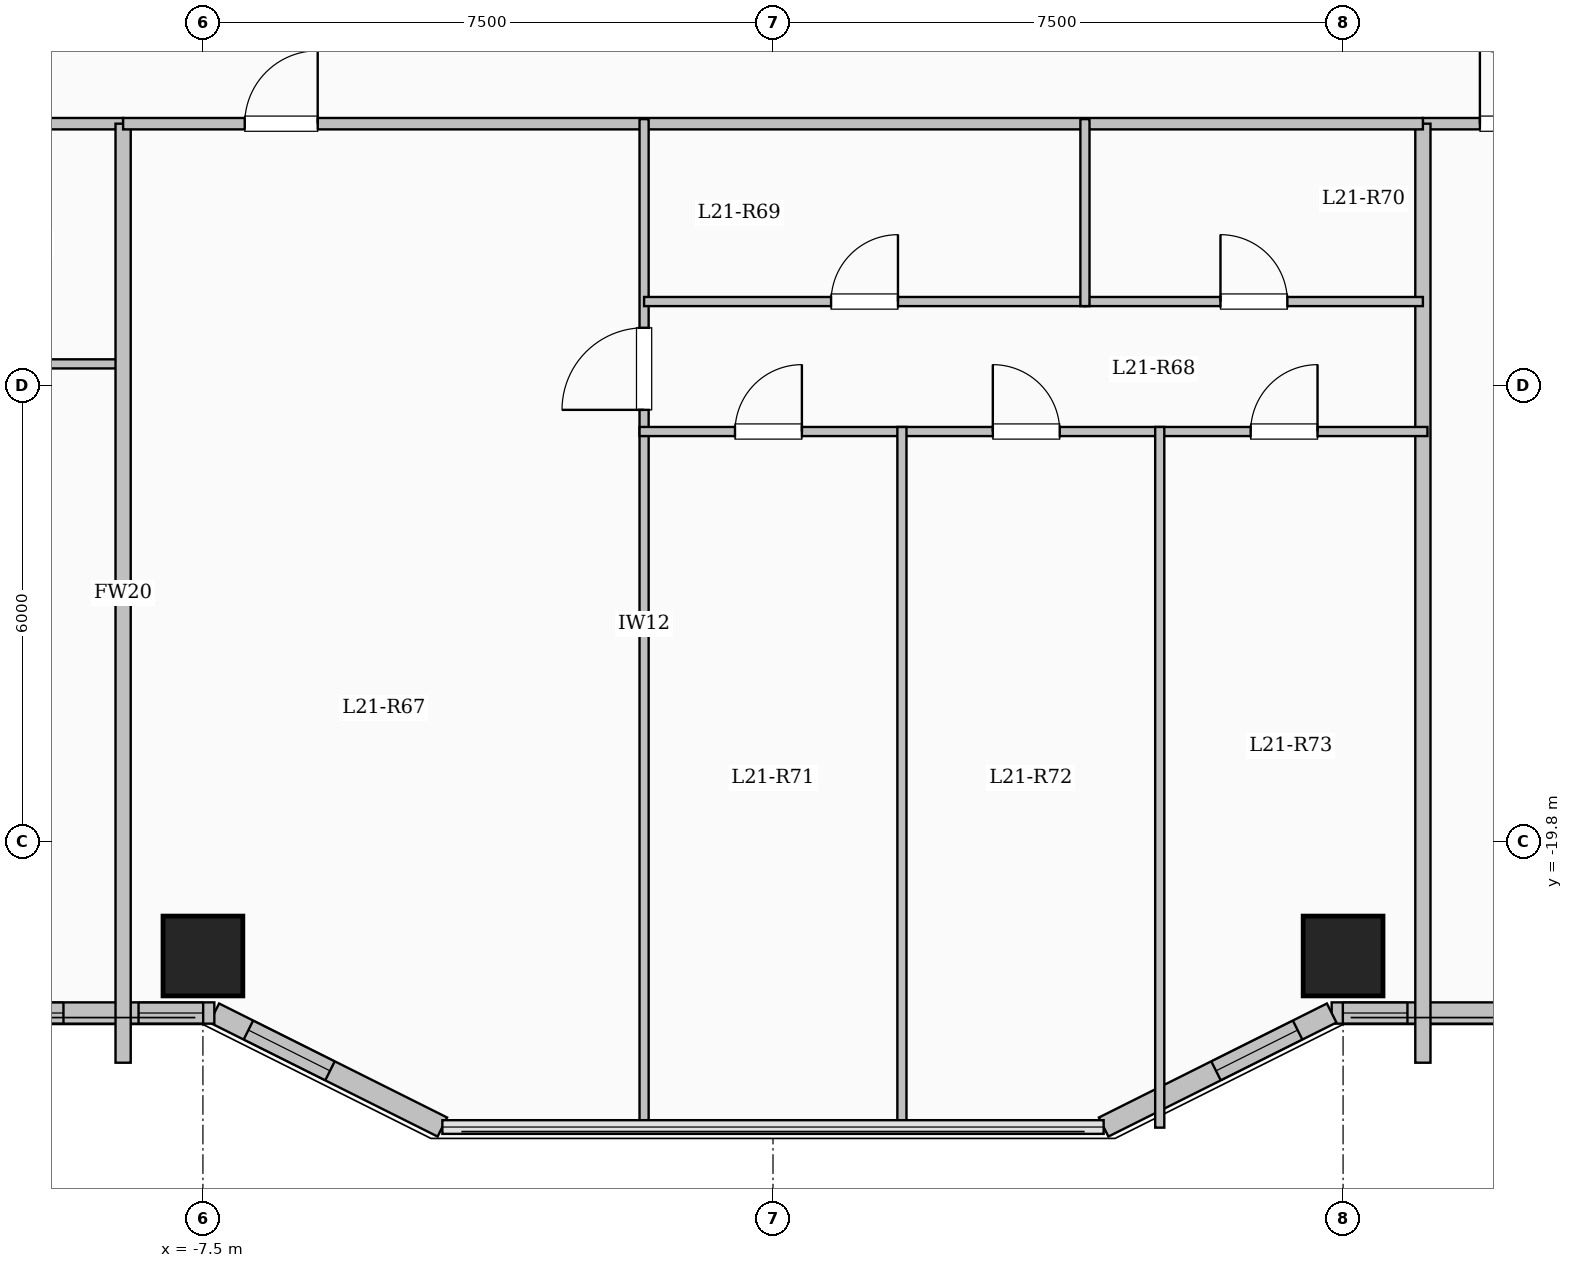
"""IFC4 building model, lengths in metres.
Left out: names, types, materials, properties, quantities, classifications, styles, units other than length and angle.
Written with IfcOpenShell. Run it as: python <this file> out.ifc"""

import sys

from ifc_helpers import new_model, si_unit, direction, frame, frame_2d, origin, origin_2d, place, context, subcontext, project, spatial, rectangle, extrude, element, fill, save


model = new_model("IFC4")
c1 = context("Model", 3, precision=1e-05, world=origin(), true_north=direction((0.0, 1.0)))
c2 = subcontext(c1, "Body", "Model", "MODEL_VIEW")
j1 = project(units=[si_unit("LENGTHUNIT", "METRE"), si_unit("PLANEANGLEUNIT", "RADIAN")], contexts=[c1])
p1 = place(None, origin())
s1 = spatial("IfcSite", under=j1, at=p1, CompositionType="ELEMENT")
p2 = place(p1, origin())
s2 = spatial("IfcBuilding", under=s1, at=p2, CompositionType="ELEMENT")
p3 = place(p2, frame((0.0, 0.0, 81.65)))
s3 = spatial("IfcBuildingStorey", under=s2, at=p3, CompositionType="ELEMENT", Elevation=81.65)
for number, where, z_axis, x_axis in (
    (1, (-7.5, -21.3, 0.0), (0.0, 0.0, 1.0), (1.0, 0.0, 0.0)),
    (2, (7.5, -21.3, 0.0), (0.0, 0.0, 1.0), (1.0, 0.0, 0.0)),
):
    element("IfcColumn", number, at=place(p3, frame(where, z_axis=z_axis, x_axis=x_axis)), inside=s3, PredefinedType="COLUMN", context=c2, shape_type="SweptSolid", body=[
        extrude(rectangle(XDim=1.05, YDim=1.05, at=origin_2d()), origin(), (0.0, 0.0, 1.0), 3.35),
    ])
p4 = place(p3, frame((21.15, -22.05, 0.0), z_axis=(0.0, 0.0, 1.0), x_axis=(-1.0, 0.0, 0.0)))
e3 = element("IfcWall", 3, at=p4, inside=s3, PredefinedType="SOLIDWALL", context=c2, shape_type="SweptSolid", body=[
    extrude(rectangle(XDim=13.8, YDim=0.28, at=frame_2d((6.9, 0.0))), origin(), (0.0, 0.0, 1.0), 3.1),
])
p5 = place(p4, frame((0.88, 0.0, 0.95)))
e4 = element("IfcOpeningElement", 4, at=p5, cuts=e3, PredefinedType="OPENING", context=c2, shape_type="SweptSolid", body=[
    extrude(rectangle(XDim=1.2, YDim=1.5, at=frame_2d((0.6, 0.75))), frame((0.0, 0.15, 0.0), z_axis=(0.0, -1.0, 0.0), x_axis=(1.0, 0.0, 0.0)), (0.0, 0.0, 1.0), 0.3),
])
p6 = place(p4, frame((3.64, 0.0, 0.95)))
e5 = element("IfcOpeningElement", 5, at=p6, cuts=e3, PredefinedType="OPENING", context=c2, shape_type="SweptSolid", body=[
    extrude(rectangle(XDim=1.2, YDim=1.5, at=frame_2d((0.6, 0.75))), frame((0.0, 0.15, 0.0), z_axis=(0.0, -1.0, 0.0), x_axis=(1.0, 0.0, 0.0)), (0.0, 0.0, 1.0), 0.3),
])
p7 = place(p4, frame((6.35, 0.0, 0.95)))
e6 = element("IfcOpeningElement", 6, at=p7, cuts=e3, PredefinedType="OPENING", context=c2, shape_type="SweptSolid", body=[
    extrude(rectangle(XDim=1.2, YDim=1.5, at=frame_2d((0.6, 0.75))), frame((0.0, 0.15, 0.0), z_axis=(0.0, -1.0, 0.0), x_axis=(1.0, 0.0, 0.0)), (0.0, 0.0, 1.0), 0.3),
])
p8 = place(p4, frame((9.238, 0.0, 0.9)))
e7 = element("IfcOpeningElement", 7, at=p8, cuts=e3, PredefinedType="OPENING", context=c2, shape_type="SweptSolid", body=[
    extrude(rectangle(XDim=2.4, YDim=1.8, at=frame_2d((1.2, 0.9))), frame((0.0, 0.15, 0.0), z_axis=(0.0, -1.0, 0.0), x_axis=(1.0, 0.0, 0.0)), (0.0, 0.0, 1.0), 0.3),
])
p9 = place(p4, frame((12.803, 0.0, 0.95)))
e8 = element("IfcOpeningElement", 8, at=p9, cuts=e3, PredefinedType="OPENING", context=c2, shape_type="SweptSolid", body=[
    extrude(rectangle(XDim=0.85, YDim=1.5, at=frame_2d((0.425, 0.75))), frame((0.0, 0.15, 0.0), z_axis=(0.0, -1.0, 0.0), x_axis=(1.0, 0.0, 0.0)), (0.0, 0.0, 1.0), 0.3),
])
p10 = place(p3, frame((7.35, -22.05, 0.0), z_axis=(0.0, 0.0, 1.0), x_axis=(-0.894427191, -0.4472135955, 0.0)))
e9 = element("IfcWall", 9, at=p10, inside=s3, PredefinedType="SOLIDWALL", context=c2, shape_type="SweptSolid", body=[
    extrude(rectangle(XDim=3.354, YDim=0.28, at=frame_2d((1.677, 0.0))), origin(), (0.0, 0.0, 1.0), 3.1),
])
p11 = place(p10, frame((0.501, 0.0, 0.95)))
e10 = element("IfcOpeningElement", 10, at=p11, cuts=e9, PredefinedType="OPENING", context=c2, shape_type="SweptSolid", body=[
    extrude(rectangle(XDim=1.2, YDim=1.5, at=frame_2d((0.6, 0.75))), frame((0.0, 0.15, 0.0), z_axis=(0.0, -1.0, 0.0), x_axis=(1.0, 0.0, 0.0)), (0.0, 0.0, 1.0), 0.3),
])
p12 = place(p3, frame((-4.35, -23.55, 0.0), z_axis=(0.0, 0.0, 1.0), x_axis=(-0.894427191, 0.4472135955, 0.0)))
e11 = element("IfcWall", 11, at=p12, inside=s3, PredefinedType="SOLIDWALL", context=c2, shape_type="SweptSolid", body=[
    extrude(rectangle(XDim=3.354, YDim=0.28, at=frame_2d((1.677, 0.0))), origin(), (0.0, 0.0, 1.0), 3.1),
])
p13 = place(p12, frame((1.653, 0.0, 0.95)))
e12 = element("IfcOpeningElement", 12, at=p13, cuts=e11, PredefinedType="OPENING", context=c2, shape_type="SweptSolid", body=[
    extrude(rectangle(XDim=1.2, YDim=1.5, at=frame_2d((0.6, 0.75))), frame((0.0, 0.15, 0.0), z_axis=(0.0, -1.0, 0.0), x_axis=(1.0, 0.0, 0.0)), (0.0, 0.0, 1.0), 0.3),
])
p14 = place(p3, frame((-7.35, -22.05, 0.0), z_axis=(0.0, 0.0, 1.0), x_axis=(-1.0, 0.0, 0.0)))
e13 = element("IfcWall", 13, at=p14, inside=s3, PredefinedType="SOLIDWALL", context=c2, shape_type="SweptSolid", body=[
    extrude(rectangle(XDim=13.8, YDim=0.28, at=frame_2d((6.9, 0.0))), origin(), (0.0, 0.0, 1.0), 3.1),
])
p15 = place(p14, frame((0.147, 0.0, 0.95)))
e14 = element("IfcOpeningElement", 14, at=p15, cuts=e13, PredefinedType="OPENING", context=c2, shape_type="SweptSolid", body=[
    extrude(rectangle(XDim=0.85, YDim=1.5, at=frame_2d((0.425, 0.75))), frame((0.0, 0.15, 0.0), z_axis=(0.0, -1.0, 0.0), x_axis=(1.0, 0.0, 0.0)), (0.0, 0.0, 1.0), 0.3),
])
p16 = place(p14, frame((1.985, 0.0, 0.9)))
e15 = element("IfcOpeningElement", 15, at=p16, cuts=e13, PredefinedType="OPENING", context=c2, shape_type="SweptSolid", body=[
    extrude(rectangle(XDim=1.5, YDim=1.65, at=frame_2d((0.75, 0.825))), frame((0.0, 0.15, 0.0), z_axis=(0.0, -1.0, 0.0), x_axis=(1.0, 0.0, 0.0)), (0.0, 0.0, 1.0), 0.3),
])
p17 = place(p14, frame((5.096, 0.0, 0.9)))
e16 = element("IfcOpeningElement", 16, at=p17, cuts=e13, PredefinedType="OPENING", context=c2, shape_type="SweptSolid", body=[
    extrude(rectangle(XDim=1.5, YDim=1.65, at=frame_2d((0.75, 0.825))), frame((0.0, 0.15, 0.0), z_axis=(0.0, -1.0, 0.0), x_axis=(1.0, 0.0, 0.0)), (0.0, 0.0, 1.0), 0.3),
])
p18 = place(p14, frame((8.208, 0.0, 0.9)))
e17 = element("IfcOpeningElement", 17, at=p18, cuts=e13, PredefinedType="OPENING", context=c2, shape_type="SweptSolid", body=[
    extrude(rectangle(XDim=1.5, YDim=1.65, at=frame_2d((0.75, 0.825))), frame((0.0, 0.15, 0.0), z_axis=(0.0, -1.0, 0.0), x_axis=(1.0, 0.0, 0.0)), (0.0, 0.0, 1.0), 0.3),
])
p19 = place(p14, frame((11.344, 0.0, 0.9)))
e18 = element("IfcOpeningElement", 18, at=p19, cuts=e13, PredefinedType="OPENING", context=c2, shape_type="SweptSolid", body=[
    extrude(rectangle(XDim=1.5, YDim=1.65, at=frame_2d((0.75, 0.825))), frame((0.0, 0.15, 0.0), z_axis=(0.0, -1.0, 0.0), x_axis=(1.0, 0.0, 0.0)), (0.0, 0.0, 1.0), 0.3),
])
p20 = place(p3, frame((-21.05, -10.35, 0.0), z_axis=(0.0, 0.0, 1.0), x_axis=(1.0, 0.0, 0.0)))
e19 = element("IfcWall", 19, at=p20, inside=s3, PredefinedType="PARTITIONING", context=c2, shape_type="SweptSolid", body=[
    extrude(rectangle(XDim=12.5, YDim=0.15, at=frame_2d((6.25, 0.0))), origin(), (0.0, 0.0, 1.0), 3.1),
])
p21 = place(p20, frame((0.7, 0.0, 0.0)))
e20 = element("IfcOpeningElement", 20, at=p21, cuts=e19, PredefinedType="OPENING", context=c2, shape_type="SweptSolid", body=[
    extrude(rectangle(XDim=0.96, YDim=2.15, at=frame_2d((0.48, 1.075))), frame((0.0, 0.085, 0.0), z_axis=(0.0, -1.0, 0.0), x_axis=(1.0, 0.0, 0.0)), (0.0, 0.0, 1.0), 0.17),
])
p22 = place(p20, frame((6.925, 0.0, 0.0)))
e21 = element("IfcOpeningElement", 21, at=p22, cuts=e19, PredefinedType="OPENING", context=c2, shape_type="SweptSolid", body=[
    extrude(rectangle(XDim=0.96, YDim=2.15, at=frame_2d((0.48, 1.075))), frame((0.0, 0.085, 0.0), z_axis=(0.0, -1.0, 0.0), x_axis=(1.0, 0.0, 0.0)), (0.0, 0.0, 1.0), 0.17),
])
p23 = place(p3, frame((8.55, -10.35, 0.0), z_axis=(0.0, 0.0, 1.0), x_axis=(1.0, 0.0, 0.0)))
e22 = element("IfcWall", 22, at=p23, inside=s3, PredefinedType="PARTITIONING", context=c2, shape_type="SweptSolid", body=[
    extrude(rectangle(XDim=12.5, YDim=0.15, at=frame_2d((6.25, 0.0))), origin(), (0.0, 0.0, 1.0), 3.1),
])
p24 = place(p23, frame((0.75, 0.0, 0.0)))
e23 = element("IfcOpeningElement", 23, at=p24, cuts=e22, PredefinedType="OPENING", context=c2, shape_type="SweptSolid", body=[
    extrude(rectangle(XDim=0.96, YDim=2.15, at=frame_2d((0.48, 1.075))), frame((0.0, 0.085, 0.0), z_axis=(0.0, -1.0, 0.0), x_axis=(1.0, 0.0, 0.0)), (0.0, 0.0, 1.0), 0.17),
])
p25 = place(p3, frame((-11.65, -13.51, 0.0), z_axis=(0.0, 0.0, 1.0), x_axis=(1.0, 0.0, 0.0)))
e24 = element("IfcWall", 24, at=p25, inside=s3, PredefinedType="PARTITIONING", context=c2, shape_type="SweptSolid", body=[
    extrude(rectangle(XDim=3.11, YDim=0.12, at=frame_2d((1.555, 0.0))), origin(), (0.0, 0.0, 1.0), 3.1),
])
for number, where, z_axis, x_axis in (
    (25, (-8.55, -22.704, 0.0), (0.0, 0.0, 1.0), (0.0, 1.0, 0.0)),
    (26, (8.55, -22.704, 0.0), (0.0, 0.0, 1.0), (0.0, 1.0, 0.0)),
):
    element("IfcWall", number, at=place(p3, frame(where, z_axis=z_axis, x_axis=x_axis)), inside=s3, PredefinedType="SOLIDWALL", context=c2, shape_type="SweptSolid", body=[
        extrude(rectangle(XDim=12.354, YDim=0.2, at=frame_2d((6.177, 0.0))), origin(), (0.0, 0.0, 1.0), 3.1),
    ])
p26 = place(p3, frame((-8.55, -10.35, 0.0), z_axis=(0.0, 0.0, 1.0), x_axis=(1.0, 0.0, 0.0)))
e27 = element("IfcWall", 27, at=p26, inside=s3, PredefinedType="PARTITIONING", context=c2, shape_type="SweptSolid", body=[
    extrude(rectangle(XDim=17.1, YDim=0.15, at=frame_2d((8.55, 0.0))), origin(), (0.0, 0.0, 1.0), 3.1),
])
p27 = place(p26, frame((1.6, 0.0, 0.0)))
e28 = element("IfcOpeningElement", 28, at=p27, cuts=e27, PredefinedType="OPENING", context=c2, shape_type="SweptSolid", body=[
    extrude(rectangle(XDim=0.96, YDim=2.15, at=frame_2d((0.48, 1.075))), frame((0.0, 0.085, 0.0), z_axis=(0.0, -1.0, 0.0), x_axis=(1.0, 0.0, 0.0)), (0.0, 0.0, 1.0), 0.17),
])
p28 = place(p3, frame((-1.696, -23.58, 0.0), z_axis=(0.0, 0.0, 1.0), x_axis=(0.0, 1.0, 0.0)))
e29 = element("IfcWall", 29, at=p28, inside=s3, PredefinedType="PARTITIONING", context=c2, shape_type="SweptSolid", body=[
    extrude(rectangle(XDim=13.29, YDim=0.12, at=frame_2d((6.645, 0.0))), origin(), (0.0, 0.0, 1.0), 3.1),
])
p29 = place(p28, frame((9.465, 0.0, 0.0)))
e30 = element("IfcOpeningElement", 30, at=p29, cuts=e29, PredefinedType="OPENING", context=c2, shape_type="SweptSolid", body=[
    extrude(rectangle(XDim=1.08, YDim=2.15, at=frame_2d((0.54, 1.075))), frame((0.0, 0.07, 0.0), z_axis=(0.0, -1.0, 0.0), x_axis=(1.0, 0.0, 0.0)), (0.0, 0.0, 1.0), 0.14),
])
p30 = place(p3, frame((-1.696, -12.69, 0.0), z_axis=(0.0, 0.0, 1.0), x_axis=(1.0, 0.0, 0.0)))
e31 = element("IfcWall", 31, at=p30, inside=s3, PredefinedType="PARTITIONING", context=c2, shape_type="SweptSolid", body=[
    extrude(rectangle(XDim=5.8, YDim=0.12, at=frame_2d((2.9, 0.0))), origin(), (0.0, 0.0, 1.0), 2.635),
])
p31 = place(p30, frame((2.46, 0.0, 0.0)))
e32 = element("IfcOpeningElement", 32, at=p31, cuts=e31, PredefinedType="OPENING", context=c2, shape_type="SweptSolid", body=[
    extrude(rectangle(XDim=0.88, YDim=2.1, at=frame_2d((0.44, 1.05))), frame((0.0, 0.07, 0.0), z_axis=(0.0, -1.0, 0.0), x_axis=(1.0, 0.0, 0.0)), (0.0, 0.0, 1.0), 0.14),
])
p32 = place(p3, frame((4.104, -12.69, 0.0), z_axis=(0.0, 0.0, 1.0), x_axis=(1.0, 0.0, 0.0)))
e33 = element("IfcWall", 33, at=p32, inside=s3, PredefinedType="PARTITIONING", context=c2, shape_type="SweptSolid", body=[
    extrude(rectangle(XDim=4.446, YDim=0.12, at=frame_2d((2.223, 0.0))), origin(), (0.0, 0.0, 1.0), 2.635),
])
p33 = place(p32, frame((1.783, 0.0, 0.0)))
e34 = element("IfcOpeningElement", 34, at=p33, cuts=e33, PredefinedType="OPENING", context=c2, shape_type="SweptSolid", body=[
    extrude(rectangle(XDim=0.88, YDim=2.1, at=frame_2d((0.44, 1.05))), frame((0.0, 0.07, 0.0), z_axis=(0.0, -1.0, 0.0), x_axis=(1.0, 0.0, 0.0)), (0.0, 0.0, 1.0), 0.14),
])
p34 = place(p3, frame((-1.756, -14.4, 0.0), z_axis=(0.0, 0.0, 1.0), x_axis=(1.0, 0.0, 0.0)))
e35 = element("IfcWall", 35, at=p34, inside=s3, PredefinedType="PARTITIONING", context=c2, shape_type="SweptSolid", body=[
    extrude(rectangle(XDim=10.366, YDim=0.12, at=frame_2d((5.183, 0.0))), origin(), (0.0, 0.0, 1.0), 2.635),
])
p35 = place(p34, frame((1.256, 0.0, 0.0)))
e36 = element("IfcOpeningElement", 36, at=p35, cuts=e35, PredefinedType="OPENING", context=c2, shape_type="SweptSolid", body=[
    extrude(rectangle(XDim=0.88, YDim=2.1, at=frame_2d((0.44, 1.05))), frame((0.0, 0.07, 0.0), z_axis=(0.0, -1.0, 0.0), x_axis=(1.0, 0.0, 0.0)), (0.0, 0.0, 1.0), 0.14),
])
p36 = place(p34, frame((4.648, 0.0, 0.0)))
e37 = element("IfcOpeningElement", 37, at=p36, cuts=e35, PredefinedType="OPENING", context=c2, shape_type="SweptSolid", body=[
    extrude(rectangle(XDim=0.88, YDim=2.1, at=frame_2d((0.44, 1.05))), frame((0.0, 0.07, 0.0), z_axis=(0.0, -1.0, 0.0), x_axis=(1.0, 0.0, 0.0)), (0.0, 0.0, 1.0), 0.14),
])
p37 = place(p34, frame((8.04, 0.0, 0.0)))
e38 = element("IfcOpeningElement", 38, at=p37, cuts=e35, PredefinedType="OPENING", context=c2, shape_type="SweptSolid", body=[
    extrude(rectangle(XDim=0.88, YDim=2.1, at=frame_2d((0.44, 1.05))), frame((0.0, 0.07, 0.0), z_axis=(0.0, -1.0, 0.0), x_axis=(1.0, 0.0, 0.0)), (0.0, 0.0, 1.0), 0.14),
])
p38 = place(p3, frame((4.104, -12.75, 0.0), z_axis=(0.0, 0.0, 1.0), x_axis=(0.0, 1.0, 0.0)))
e39 = element("IfcWall", 39, at=p38, inside=s3, PredefinedType="PARTITIONING", context=c2, shape_type="SweptSolid", body=[
    extrude(rectangle(XDim=2.46, YDim=0.12, at=frame_2d((1.23, 0.0))), origin(), (0.0, 0.0, 1.0), 3.1),
])
p39 = place(p3, frame((1.696, -23.58, 0.0), z_axis=(0.0, 0.0, 1.0), x_axis=(0.0, 1.0, 0.0)))
e40 = element("IfcWall", 40, at=p39, inside=s3, PredefinedType="PARTITIONING", context=c2, shape_type="SweptSolid", body=[
    extrude(rectangle(XDim=9.24, YDim=0.12, at=frame_2d((4.62, 0.0))), origin(), (0.0, 0.0, 1.0), 3.1),
])
p40 = place(p3, frame((5.088, -23.558, 0.0), z_axis=(0.0, 0.0, 1.0), x_axis=(0.0, 1.0, 0.0)))
e41 = element("IfcWall", 41, at=p40, inside=s3, PredefinedType="PARTITIONING", context=c2, shape_type="SweptSolid", body=[
    extrude(rectangle(XDim=9.218, YDim=0.12, at=frame_2d((4.609, 0.0))), origin(), (0.0, 0.0, 1.0), 3.1),
])
p41 = place(p9, origin())
e42 = element("IfcWindow", 42, at=p41, inside=s3, PartitioningType="SINGLE_PANEL", PredefinedType="WINDOW", context=c2, shape_type="SweptSolid", body=[
    extrude(rectangle(XDim=0.85, YDim=1.5, at=frame_2d((0.425, 0.75))), frame((0.0, 0.03, 0.0), z_axis=(0.0, -1.0, 0.0), x_axis=(1.0, 0.0, 0.0)), (0.0, 0.0, 1.0), 0.06),
])
fill(e8, e42)
p42 = place(p11, origin())
e43 = element("IfcWindow", 43, at=p42, inside=s3, PartitioningType="SINGLE_PANEL", PredefinedType="WINDOW", context=c2, shape_type="SweptSolid", body=[
    extrude(rectangle(XDim=1.2, YDim=1.5, at=frame_2d((0.6, 0.75))), frame((0.0, 0.03, 0.0), z_axis=(0.0, -1.0, 0.0), x_axis=(1.0, 0.0, 0.0)), (0.0, 0.0, 1.0), 0.06),
])
fill(e10, e43)
p43 = place(p13, origin())
e44 = element("IfcWindow", 44, at=p43, inside=s3, PartitioningType="SINGLE_PANEL", PredefinedType="WINDOW", context=c2, shape_type="SweptSolid", body=[
    extrude(rectangle(XDim=1.2, YDim=1.5, at=frame_2d((0.6, 0.75))), frame((0.0, 0.03, 0.0), z_axis=(0.0, -1.0, 0.0), x_axis=(1.0, 0.0, 0.0)), (0.0, 0.0, 1.0), 0.06),
])
fill(e12, e44)
p44 = place(p15, origin())
e45 = element("IfcWindow", 45, at=p44, inside=s3, PartitioningType="SINGLE_PANEL", PredefinedType="WINDOW", context=c2, shape_type="SweptSolid", body=[
    extrude(rectangle(XDim=0.85, YDim=1.5, at=frame_2d((0.425, 0.75))), frame((0.0, 0.03, 0.0), z_axis=(0.0, -1.0, 0.0), x_axis=(1.0, 0.0, 0.0)), (0.0, 0.0, 1.0), 0.06),
])
fill(e14, e45)
p45 = place(p16, origin())
e46 = element("IfcWindow", 46, at=p45, inside=s3, PartitioningType="SINGLE_PANEL", PredefinedType="WINDOW", context=c2, shape_type="SweptSolid", body=[
    extrude(rectangle(XDim=1.5, YDim=1.65, at=frame_2d((0.75, 0.825))), frame((0.0, 0.03, 0.0), z_axis=(0.0, -1.0, 0.0), x_axis=(1.0, 0.0, 0.0)), (0.0, 0.0, 1.0), 0.06),
])
fill(e15, e46)
p46 = place(p24, origin())
e47 = element("IfcDoor", 47, at=p46, inside=s3, OperationType="SINGLE_SWING_LEFT", PredefinedType="DOOR", context=c2, shape_type="SweptSolid", body=[
    extrude(rectangle(XDim=0.96, YDim=2.15, at=frame_2d((0.48, 1.075))), frame((0.0, 0.025, 0.0), z_axis=(0.0, -1.0, 0.0), x_axis=(1.0, 0.0, 0.0)), (0.0, 0.0, 1.0), 0.05),
])
fill(e23, e47)
p47 = place(p27, origin())
e48 = element("IfcDoor", 48, at=p47, inside=s3, OperationType="SINGLE_SWING_RIGHT", PredefinedType="DOOR", context=c2, shape_type="SweptSolid", body=[
    extrude(rectangle(XDim=0.96, YDim=2.15, at=frame_2d((0.48, 1.075))), frame((0.0, 0.025, 0.0), z_axis=(0.0, -1.0, 0.0), x_axis=(1.0, 0.0, 0.0)), (0.0, 0.0, 1.0), 0.05),
])
fill(e28, e48)
p48 = place(p29, origin())
e49 = element("IfcDoor", 49, at=p48, inside=s3, OperationType="SINGLE_SWING_LEFT", PredefinedType="DOOR", context=c2, shape_type="SweptSolid", body=[
    extrude(rectangle(XDim=1.08, YDim=2.15, at=frame_2d((0.54, 1.075))), frame((0.0, 0.025, 0.0), z_axis=(0.0, -1.0, 0.0), x_axis=(1.0, 0.0, 0.0)), (0.0, 0.0, 1.0), 0.05),
])
fill(e30, e49)
p49 = place(p31, origin())
e50 = element("IfcDoor", 50, at=p49, inside=s3, OperationType="SINGLE_SWING_RIGHT", PredefinedType="DOOR", context=c2, shape_type="SweptSolid", body=[
    extrude(rectangle(XDim=0.88, YDim=2.1, at=frame_2d((0.44, 1.05))), frame((0.0, 0.025, 0.0), z_axis=(0.0, -1.0, 0.0), x_axis=(1.0, 0.0, 0.0)), (0.0, 0.0, 1.0), 0.05),
])
fill(e32, e50)
p50 = place(p33, origin())
e51 = element("IfcDoor", 51, at=p50, inside=s3, OperationType="SINGLE_SWING_LEFT", PredefinedType="DOOR", context=c2, shape_type="SweptSolid", body=[
    extrude(rectangle(XDim=0.88, YDim=2.1, at=frame_2d((0.44, 1.05))), frame((0.0, 0.025, 0.0), z_axis=(0.0, -1.0, 0.0), x_axis=(1.0, 0.0, 0.0)), (0.0, 0.0, 1.0), 0.05),
])
fill(e34, e51)
p51 = place(p35, origin())
e52 = element("IfcDoor", 52, at=p51, inside=s3, OperationType="SINGLE_SWING_RIGHT", PredefinedType="DOOR", context=c2, shape_type="SweptSolid", body=[
    extrude(rectangle(XDim=0.88, YDim=2.1, at=frame_2d((0.44, 1.05))), frame((0.0, 0.025, 0.0), z_axis=(0.0, -1.0, 0.0), x_axis=(1.0, 0.0, 0.0)), (0.0, 0.0, 1.0), 0.05),
])
fill(e36, e52)
p52 = place(p36, origin())
e53 = element("IfcDoor", 53, at=p52, inside=s3, OperationType="SINGLE_SWING_LEFT", PredefinedType="DOOR", context=c2, shape_type="SweptSolid", body=[
    extrude(rectangle(XDim=0.88, YDim=2.1, at=frame_2d((0.44, 1.05))), frame((0.0, 0.025, 0.0), z_axis=(0.0, -1.0, 0.0), x_axis=(1.0, 0.0, 0.0)), (0.0, 0.0, 1.0), 0.05),
])
fill(e37, e53)
p53 = place(p37, origin())
e54 = element("IfcDoor", 54, at=p53, inside=s3, OperationType="SINGLE_SWING_RIGHT", PredefinedType="DOOR", context=c2, shape_type="SweptSolid", body=[
    extrude(rectangle(XDim=0.88, YDim=2.1, at=frame_2d((0.44, 1.05))), frame((0.0, 0.025, 0.0), z_axis=(0.0, -1.0, 0.0), x_axis=(1.0, 0.0, 0.0)), (0.0, 0.0, 1.0), 0.05),
])
fill(e38, e54)
save(model, sys.argv[1])
